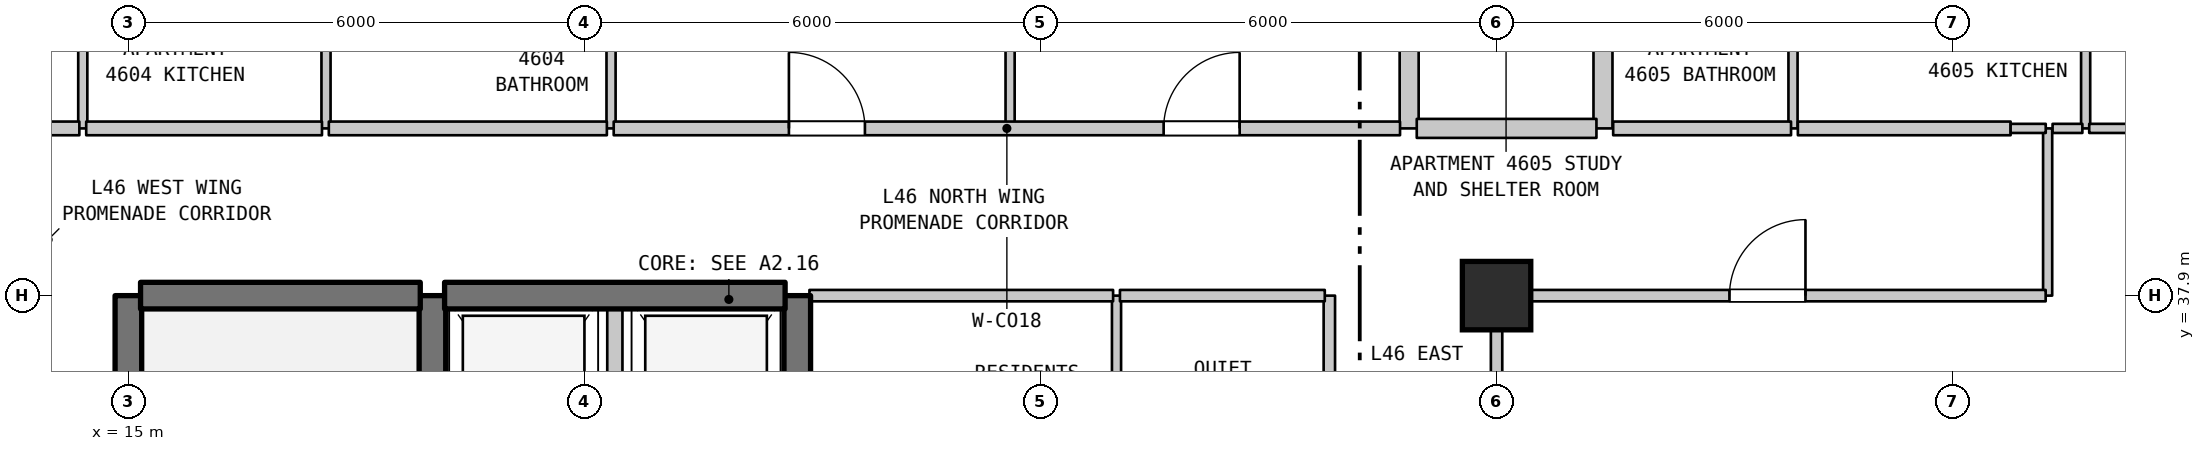
"""IFC4 building model, lengths in metres.
Left out: names, types, materials, properties, quantities, classifications, styles, units other than length and angle.
Written with IfcOpenShell. Run it as: python <this file> out.ifc"""

import sys

from ifc_helpers import new_model, si_unit, direction, frame, frame_2d, origin, origin_2d, place, context, subcontext, project, spatial, rectangle, extrude, element, fill, save


model = new_model("IFC4")
c1 = context("Model", 3, precision=1e-05, world=origin(), true_north=direction((0.0, 1.0)))
c2 = subcontext(c1, "Body", "Model", "MODEL_VIEW")
j1 = project(units=[si_unit("LENGTHUNIT", "METRE"), si_unit("PLANEANGLEUNIT", "RADIAN")], contexts=[c1])
p1 = place(None, origin())
s1 = spatial("IfcSite", under=j1, at=p1, CompositionType="ELEMENT")
p2 = place(p1, origin())
s2 = spatial("IfcBuilding", under=s1, at=p2, CompositionType="ELEMENT")
p3 = place(p2, frame((0.0, 0.0, 188.4)))
s3 = spatial("IfcBuildingStorey", under=s2, at=p3, CompositionType="ELEMENT", Elevation=188.4)
p4 = place(p3, frame((33.0, 37.9, 0.0), z_axis=(0.0, 0.0, 1.0), x_axis=(1.0, 0.0, 0.0)))
e1 = element("IfcColumn", 1, at=p4, inside=s3, PredefinedType="COLUMN", context=c2, shape_type="SweptSolid", body=[
    extrude(rectangle(XDim=0.9, YDim=0.9, at=origin_2d()), origin(), (0.0, 0.0, 1.0), 3.7),
])
p5 = place(p3, frame((14.4, 40.1, 0.0), z_axis=(0.0, 0.0, 1.0), x_axis=(0.0, 1.0, 0.0)))
e2 = element("IfcWall", 2, at=p5, inside=s3, PredefinedType="PARTITIONING", context=c2, shape_type="SweptSolid", body=[
    extrude(rectangle(XDim=2.3, YDim=0.12, at=frame_2d((1.15, 0.0))), origin(), (0.0, 0.0, 1.0), 3.39),
])
p6 = place(p3, frame((15.0, 31.1, 0.0), z_axis=(0.0, 0.0, 1.0), x_axis=(0.0, 1.0, 0.0)))
e3 = element("IfcWall", 3, at=p6, inside=s3, PredefinedType="SHEAR", context=c2, shape_type="SweptSolid", body=[
    extrude(rectangle(XDim=6.8, YDim=0.35, at=frame_2d((3.4, 0.0))), origin(), (0.0, 0.0, 1.0), 3.39),
])
p7 = place(p3, frame((17.6, 40.1, 0.0), z_axis=(0.0, 0.0, 1.0), x_axis=(0.0, 1.0, 0.0)))
e4 = element("IfcWall", 4, at=p7, inside=s3, PredefinedType="PARTITIONING", context=c2, shape_type="SweptSolid", body=[
    extrude(rectangle(XDim=2.3, YDim=0.12, at=frame_2d((1.15, 0.0))), origin(), (0.0, 0.0, 1.0), 3.39),
])
p8 = place(p3, frame((19.0, 35.0, 0.0), z_axis=(0.0, 0.0, 1.0), x_axis=(0.0, 1.0, 0.0)))
e5 = element("IfcWall", 5, at=p8, inside=s3, PredefinedType="SHEAR", context=c2, shape_type="SweptSolid", body=[
    extrude(rectangle(XDim=2.9, YDim=0.35, at=frame_2d((1.45, 0.0))), origin(), (0.0, 0.0, 1.0), 3.39),
])
p9 = place(p3, frame((21.35, 40.1, 0.0), z_axis=(0.0, 0.0, 1.0), x_axis=(0.0, 1.0, 0.0)))
e6 = element("IfcWall", 6, at=p9, inside=s3, PredefinedType="PARTITIONING", context=c2, shape_type="SweptSolid", body=[
    extrude(rectangle(XDim=2.3, YDim=0.12, at=frame_2d((1.15, 0.0))), origin(), (0.0, 0.0, 1.0), 3.39),
])
p10 = place(p3, frame((21.4, 35.0, 0.0), z_axis=(0.0, 0.0, 1.0), x_axis=(0.0, 1.0, 0.0)))
e7 = element("IfcWall", 7, at=p10, inside=s3, PredefinedType="STANDARD", context=c2, shape_type="SweptSolid", body=[
    extrude(rectangle(XDim=2.9, YDim=0.2, at=frame_2d((1.45, 0.0))), origin(), (0.0, 0.0, 1.0), 3.39),
])
p11 = place(p3, frame((23.8, 35.0, 0.0), z_axis=(0.0, 0.0, 1.0), x_axis=(0.0, 1.0, 0.0)))
e8 = element("IfcWall", 8, at=p11, inside=s3, PredefinedType="SHEAR", context=c2, shape_type="SweptSolid", body=[
    extrude(rectangle(XDim=2.9, YDim=0.35, at=frame_2d((1.45, 0.0))), origin(), (0.0, 0.0, 1.0), 3.39),
])
p12 = place(p3, frame((26.6, 40.1, 0.0), z_axis=(0.0, 0.0, 1.0), x_axis=(0.0, 1.0, 0.0)))
e9 = element("IfcWall", 9, at=p12, inside=s3, PredefinedType="PARTITIONING", context=c2, shape_type="SweptSolid", body=[
    extrude(rectangle(XDim=2.05, YDim=0.12, at=frame_2d((1.025, 0.0))), origin(), (0.0, 0.0, 1.0), 3.39),
])
p13 = place(p3, frame((28.0, 35.0, 0.0), z_axis=(0.0, 0.0, 1.0), x_axis=(0.0, 1.0, 0.0)))
e10 = element("IfcWall", 10, at=p13, inside=s3, PredefinedType="PARTITIONING", context=c2, shape_type="SweptSolid", body=[
    extrude(rectangle(XDim=2.9, YDim=0.12, at=frame_2d((1.45, 0.0))), origin(), (0.0, 0.0, 1.0), 3.39),
])
p14 = place(p3, frame((30.8, 35.0, 0.0), z_axis=(0.0, 0.0, 1.0), x_axis=(0.0, 1.0, 0.0)))
e11 = element("IfcWall", 11, at=p14, inside=s3, PredefinedType="STANDARD", context=c2, shape_type="SweptSolid", body=[
    extrude(rectangle(XDim=2.9, YDim=0.15, at=frame_2d((1.45, 0.0))), origin(), (0.0, 0.0, 1.0), 3.39),
])
p15 = place(p3, frame((31.85, 40.1, 0.0), z_axis=(0.0, 0.0, 1.0), x_axis=(0.0, 1.0, 0.0)))
e12 = element("IfcWall", 12, at=p15, inside=s3, PredefinedType="STANDARD", context=c2, shape_type="SweptSolid", body=[
    extrude(rectangle(XDim=2.3, YDim=0.25, at=frame_2d((1.15, 0.0))), origin(), (0.0, 0.0, 1.0), 3.39),
])
p16 = place(p3, frame((33.0, 32.54, 0.0), z_axis=(0.0, 0.0, 1.0), x_axis=(0.0, 1.0, 0.0)))
e13 = element("IfcWall", 13, at=p16, inside=s3, PredefinedType="STANDARD", context=c2, shape_type="SweptSolid", body=[
    extrude(rectangle(XDim=5.36, YDim=0.15, at=frame_2d((2.68, 0.0))), origin(), (0.0, 0.0, 1.0), 2.89),
])
p17 = place(p16, frame((2.109, 0.0, 0.0)))
e14 = element("IfcOpeningElement", 14, at=p17, cuts=e13, PredefinedType="OPENING", context=c2, shape_type="SweptSolid", body=[
    extrude(rectangle(XDim=1.0, YDim=2.15, at=frame_2d((0.5, 1.075))), frame((0.0, 0.085, 0.0), z_axis=(0.0, -1.0, 0.0), x_axis=(1.0, 0.0, 0.0)), (0.0, 0.0, 1.0), 0.17),
])
p18 = place(p3, frame((34.4, 40.1, 0.0), z_axis=(0.0, 0.0, 1.0), x_axis=(0.0, 1.0, 0.0)))
e15 = element("IfcWall", 15, at=p18, inside=s3, PredefinedType="STANDARD", context=c2, shape_type="SweptSolid", body=[
    extrude(rectangle(XDim=2.3, YDim=0.25, at=frame_2d((1.15, 0.0))), origin(), (0.0, 0.0, 1.0), 3.39),
])
p19 = place(p3, frame((36.9, 40.1, 0.0), z_axis=(0.0, 0.0, 1.0), x_axis=(0.0, 1.0, 0.0)))
e16 = element("IfcWall", 16, at=p19, inside=s3, PredefinedType="PARTITIONING", context=c2, shape_type="SweptSolid", body=[
    extrude(rectangle(XDim=2.3, YDim=0.12, at=frame_2d((1.15, 0.0))), origin(), (0.0, 0.0, 1.0), 3.39),
])
p20 = place(p3, frame((40.25, 37.9, 0.0), z_axis=(0.0, 0.0, 1.0), x_axis=(0.0, 1.0, 0.0)))
e17 = element("IfcWall", 17, at=p20, inside=s3, PredefinedType="PARTITIONING", context=c2, shape_type="SweptSolid", body=[
    extrude(rectangle(XDim=2.2, YDim=0.12, at=frame_2d((1.1, 0.0))), origin(), (0.0, 0.0, 1.0), 3.39),
])
p21 = place(p3, frame((40.75, 40.1, 0.0), z_axis=(0.0, 0.0, 1.0), x_axis=(0.0, 1.0, 0.0)))
e18 = element("IfcWall", 18, at=p21, inside=s3, PredefinedType="PARTITIONING", context=c2, shape_type="SweptSolid", body=[
    extrude(rectangle(XDim=2.3, YDim=0.12, at=frame_2d((1.15, 0.0))), origin(), (0.0, 0.0, 1.0), 3.39),
])
p22 = place(p3, frame((15.16, 37.9, 0.0), z_axis=(0.0, 0.0, 1.0), x_axis=(1.0, 0.0, 0.0)))
e19 = element("IfcWall", 19, at=p22, inside=s3, PredefinedType="SHEAR", context=c2, shape_type="SweptSolid", body=[
    extrude(rectangle(XDim=3.68, YDim=0.35, at=frame_2d((1.84, 0.0))), origin(), (0.0, 0.0, 1.0), 3.39),
])
p23 = place(p3, frame((19.16, 37.9, 0.0), z_axis=(0.0, 0.0, 1.0), x_axis=(1.0, 0.0, 0.0)))
e20 = element("IfcWall", 20, at=p23, inside=s3, PredefinedType="SHEAR", context=c2, shape_type="SweptSolid", body=[
    extrude(rectangle(XDim=4.48, YDim=0.35, at=frame_2d((2.24, 0.0))), origin(), (0.0, 0.0, 1.0), 3.39),
])
p24 = place(p3, frame((23.96, 37.9, 0.0), z_axis=(0.0, 0.0, 1.0), x_axis=(1.0, 0.0, 0.0)))
e21 = element("IfcWall", 21, at=p24, inside=s3, PredefinedType="STANDARD", context=c2, shape_type="SweptSolid", body=[
    extrude(rectangle(XDim=3.995, YDim=0.15, at=frame_2d((1.998, 0.0))), origin(), (0.0, 0.0, 1.0), 2.89),
])
p25 = place(p3, frame((28.045, 37.9, 0.0), z_axis=(0.0, 0.0, 1.0), x_axis=(1.0, 0.0, 0.0)))
e22 = element("IfcWall", 22, at=p25, inside=s3, PredefinedType="STANDARD", context=c2, shape_type="SweptSolid", body=[
    extrude(rectangle(XDim=2.695, YDim=0.15, at=frame_2d((1.348, 0.0))), origin(), (0.0, 0.0, 1.0), 2.89),
])
p26 = place(p3, frame((33.06, 37.9, 0.0), z_axis=(0.0, 0.0, 1.0), x_axis=(1.0, 0.0, 0.0)))
e23 = element("IfcWall", 23, at=p26, inside=s3, PredefinedType="STANDARD", context=c2, shape_type="SweptSolid", body=[
    extrude(rectangle(XDim=7.164, YDim=0.15, at=frame_2d((3.582, 0.0))), origin(), (0.0, 0.0, 1.0), 3.39),
])
p27 = place(p26, frame((3.004, 0.0, 0.0)))
e24 = element("IfcOpeningElement", 24, at=p27, cuts=e23, PredefinedType="OPENING", context=c2, shape_type="SweptSolid", body=[
    extrude(rectangle(XDim=1.0, YDim=2.15, at=frame_2d((0.5, 1.075))), frame((0.0, 0.085, 0.0), z_axis=(0.0, -1.0, 0.0), x_axis=(1.0, 0.0, 0.0)), (0.0, 0.0, 1.0), 0.17),
])
p28 = place(p3, frame((12.875, 40.1, 0.0), z_axis=(0.0, 0.0, 1.0), x_axis=(1.0, 0.0, 0.0)))
e25 = element("IfcWall", 25, at=p28, inside=s3, PredefinedType="STANDARD", context=c2, shape_type="SweptSolid", body=[
    extrude(rectangle(XDim=1.48, YDim=0.18, at=frame_2d((0.74, 0.0))), origin(), (0.0, 0.0, 1.0), 3.39),
])
p29 = place(p3, frame((14.445, 40.1, 0.0), z_axis=(0.0, 0.0, 1.0), x_axis=(1.0, 0.0, 0.0)))
e26 = element("IfcWall", 26, at=p29, inside=s3, PredefinedType="STANDARD", context=c2, shape_type="SweptSolid", body=[
    extrude(rectangle(XDim=3.102, YDim=0.18, at=frame_2d((1.551, 0.0))), origin(), (0.0, 0.0, 1.0), 3.39),
])
p30 = place(p3, frame((17.637, 40.1, 0.0), z_axis=(0.0, 0.0, 1.0), x_axis=(1.0, 0.0, 0.0)))
e27 = element("IfcWall", 27, at=p30, inside=s3, PredefinedType="STANDARD", context=c2, shape_type="SweptSolid", body=[
    extrude(rectangle(XDim=3.658, YDim=0.18, at=frame_2d((1.829, 0.0))), origin(), (0.0, 0.0, 1.0), 3.39),
])
p31 = place(p3, frame((21.385, 40.1, 0.0), z_axis=(0.0, 0.0, 1.0), x_axis=(1.0, 0.0, 0.0)))
e28 = element("IfcWall", 28, at=p31, inside=s3, PredefinedType="STANDARD", context=c2, shape_type="SweptSolid", body=[
    extrude(rectangle(XDim=10.345, YDim=0.18, at=frame_2d((5.172, 0.0))), origin(), (0.0, 0.0, 1.0), 3.39),
])
p32 = place(p31, frame((2.305, 0.0, 0.0)))
e29 = element("IfcOpeningElement", 29, at=p32, cuts=e28, PredefinedType="OPENING", context=c2, shape_type="SweptSolid", body=[
    extrude(rectangle(XDim=1.0, YDim=2.15, at=frame_2d((0.5, 1.075))), frame((0.0, 0.1, 0.0), z_axis=(0.0, -1.0, 0.0), x_axis=(1.0, 0.0, 0.0)), (0.0, 0.0, 1.0), 0.2),
])
p33 = place(p31, frame((7.235, 0.0, 0.0)))
e30 = element("IfcOpeningElement", 30, at=p33, cuts=e28, PredefinedType="OPENING", context=c2, shape_type="SweptSolid", body=[
    extrude(rectangle(XDim=1.0, YDim=2.15, at=frame_2d((0.5, 1.075))), frame((0.0, 0.1, 0.0), z_axis=(0.0, -1.0, 0.0), x_axis=(1.0, 0.0, 0.0)), (0.0, 0.0, 1.0), 0.2),
])
p34 = place(p3, frame((31.95, 40.1, 0.0), z_axis=(0.0, 0.0, 1.0), x_axis=(1.0, 0.0, 0.0)))
e31 = element("IfcWall", 31, at=p34, inside=s3, PredefinedType="STANDARD", context=c2, shape_type="SweptSolid", body=[
    extrude(rectangle(XDim=2.364, YDim=0.25, at=frame_2d((1.182, 0.0))), origin(), (0.0, 0.0, 1.0), 3.39),
])
p35 = place(p3, frame((34.534, 40.1, 0.0), z_axis=(0.0, 0.0, 1.0), x_axis=(1.0, 0.0, 0.0)))
e32 = element("IfcWall", 32, at=p35, inside=s3, PredefinedType="STANDARD", context=c2, shape_type="SweptSolid", body=[
    extrude(rectangle(XDim=2.34, YDim=0.18, at=frame_2d((1.17, 0.0))), origin(), (0.0, 0.0, 1.0), 3.39),
])
p36 = place(p3, frame((36.964, 40.1, 0.0), z_axis=(0.0, 0.0, 1.0), x_axis=(1.0, 0.0, 0.0)))
e33 = element("IfcWall", 33, at=p36, inside=s3, PredefinedType="STANDARD", context=c2, shape_type="SweptSolid", body=[
    extrude(rectangle(XDim=2.799, YDim=0.18, at=frame_2d((1.399, 0.0))), origin(), (0.0, 0.0, 1.0), 3.39),
])
p37 = place(p3, frame((39.763, 40.1, 0.0), z_axis=(0.0, 0.0, 1.0), x_axis=(1.0, 0.0, 0.0)))
e34 = element("IfcWall", 34, at=p37, inside=s3, PredefinedType="PARTITIONING", context=c2, shape_type="SweptSolid", body=[
    extrude(rectangle(XDim=0.462, YDim=0.12, at=frame_2d((0.231, 0.0))), origin(), (0.0, 0.0, 1.0), 3.39),
])
p38 = place(p3, frame((40.315, 40.1, 0.0), z_axis=(0.0, 0.0, 1.0), x_axis=(1.0, 0.0, 0.0)))
e35 = element("IfcWall", 35, at=p38, inside=s3, PredefinedType="PARTITIONING", context=c2, shape_type="SweptSolid", body=[
    extrude(rectangle(XDim=0.392, YDim=0.12, at=frame_2d((0.196, 0.0))), origin(), (0.0, 0.0, 1.0), 3.39),
])
p39 = place(p3, frame((40.797, 40.1, 0.0), z_axis=(0.0, 0.0, 1.0), x_axis=(1.0, 0.0, 0.0)))
e36 = element("IfcWall", 36, at=p39, inside=s3, PredefinedType="PARTITIONING", context=c2, shape_type="SweptSolid", body=[
    extrude(rectangle(XDim=1.378, YDim=0.12, at=frame_2d((0.689, 0.0))), origin(), (0.0, 0.0, 1.0), 3.39),
])
p40 = place(p27, origin())
e37 = element("IfcDoor", 37, at=p40, inside=s3, OperationType="SINGLE_SWING_RIGHT", PredefinedType="DOOR", context=c2, shape_type="SweptSolid", body=[
    extrude(rectangle(XDim=1.0, YDim=2.15, at=frame_2d((0.5, 1.075))), frame((0.0, 0.025, 0.0), z_axis=(0.0, -1.0, 0.0), x_axis=(1.0, 0.0, 0.0)), (0.0, 0.0, 1.0), 0.05),
])
fill(e24, e37)
p41 = place(p32, origin())
e38 = element("IfcDoor", 38, at=p41, inside=s3, OperationType="SINGLE_SWING_LEFT", PredefinedType="DOOR", context=c2, shape_type="SweptSolid", body=[
    extrude(rectangle(XDim=1.0, YDim=2.15, at=frame_2d((0.5, 1.075))), frame((0.0, 0.025, 0.0), z_axis=(0.0, -1.0, 0.0), x_axis=(1.0, 0.0, 0.0)), (0.0, 0.0, 1.0), 0.05),
])
fill(e29, e38)
p42 = place(p33, origin())
e39 = element("IfcDoor", 39, at=p42, inside=s3, OperationType="SINGLE_SWING_RIGHT", PredefinedType="DOOR", context=c2, shape_type="SweptSolid", body=[
    extrude(rectangle(XDim=1.0, YDim=2.15, at=frame_2d((0.5, 1.075))), frame((0.0, 0.025, 0.0), z_axis=(0.0, -1.0, 0.0), x_axis=(1.0, 0.0, 0.0)), (0.0, 0.0, 1.0), 0.05),
])
fill(e30, e39)
save(model, sys.argv[1])
